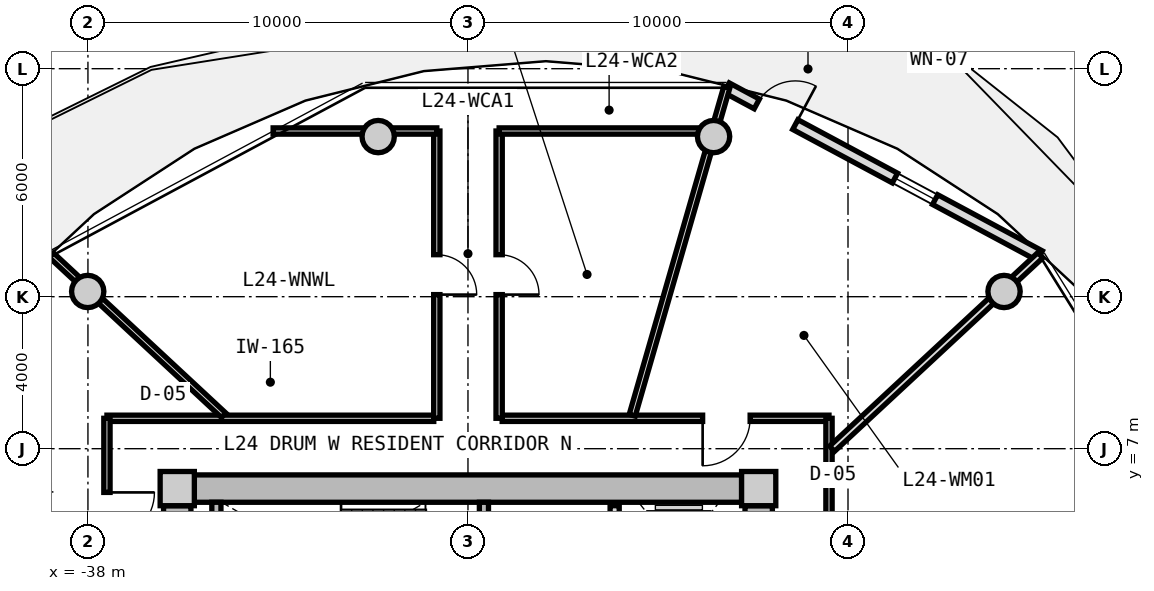
"""IFC4 building model, lengths in metres.
Left out: names, types, materials, properties, quantities, classifications, styles, units other than length and angle.
Written with IfcOpenShell. Run it as: python <this file> out.ifc"""

import sys

from ifc_helpers import new_model, si_unit, direction, frame, frame_2d, origin, origin_2d, place, context, subcontext, project, spatial, rectangle, circle, extrude, source, transform, mapped, element, fill, save


model = new_model("IFC4")
c1 = context("Model", 3, precision=1e-05, world=origin(), true_north=direction((0.0, 1.0)))
c2 = subcontext(c1, "Body", "Model", "MODEL_VIEW")
j1 = project(units=[si_unit("LENGTHUNIT", "METRE"), si_unit("PLANEANGLEUNIT", "RADIAN")], contexts=[c1])
p1 = place(None, origin())
s1 = spatial("IfcSite", under=j1, at=p1, CompositionType="ELEMENT")
p2 = place(p1, origin())
s2 = spatial("IfcBuilding", under=s1, at=p2, CompositionType="ELEMENT")
p3 = place(p2, frame((0.0, 0.0, 81.0)))
s3 = spatial("IfcBuildingStorey", under=s2, at=p3, CompositionType="ELEMENT", Elevation=81.0)
m1 = source(origin(), c2, "Body", "SweptSolid", [
    extrude(rectangle(XDim=0.9, YDim=0.9, at=origin_2d()), origin(), (0.0, 0.0, 1.0), 3.05),
])
for number, where, z_axis, x_axis in (
    (1, (-20.35, 5.95, 0.0), (0.0, 0.0, 1.0), (1.0, 0.0, 0.0)),
    (2, (-35.65, 5.95, 0.0), (0.0, 0.0, 1.0), (1.0, 0.0, 0.0)),
):
    element("IfcColumn", number, at=place(p3, frame(where, z_axis=z_axis, x_axis=x_axis)), inside=s3, PredefinedType="COLUMN", context=c2, shape_type="MappedRepresentation", body=[
        mapped(m1, transform((0.0, 0.0, 0.0), x_axis=(1.0, 0.0, 0.0), y_axis=(0.0, 1.0, 0.0), z_axis=(0.0, 0.0, 1.0), scale=1.0)),
    ])
m2 = source(origin(), c2, "Body", "SweptSolid", [
    extrude(rectangle(XDim=14.4, YDim=0.72, at=frame_2d((7.2, 0.0))), origin(), (0.0, 0.0, 1.0), 2.79),
])
p4 = place(p3, frame((-35.2, 5.95, 0.0), z_axis=(0.0, 0.0, 1.0), x_axis=(1.0, 0.0, 0.0)))
e3 = element("IfcWall", 3, at=p4, inside=s3, PredefinedType="SHEAR", context=c2, shape_type="MappedRepresentation", body=[
    mapped(m2, transform((0.0, 0.0, 0.0), x_axis=(1.0, 0.0, 0.0), y_axis=(0.0, 1.0, 0.0), z_axis=(0.0, 0.0, 1.0), scale=1.0)),
])
m3 = source(origin(), c2, "Body", "SweptSolid", [
    extrude(rectangle(XDim=11.0, YDim=0.72, at=frame_2d((5.5, 0.0))), origin(), (0.0, 0.0, 1.0), 2.79),
])
p5 = place(p3, frame((-35.65, -5.5, 0.0), z_axis=(0.0, 0.0, 1.0), x_axis=(0.0, 1.0, 0.0)))
e4 = element("IfcWall", 4, at=p5, inside=s3, PredefinedType="SHEAR", context=c2, shape_type="MappedRepresentation", body=[
    mapped(m3, transform((0.0, 0.0, 0.0), x_axis=(1.0, 0.0, 0.0), y_axis=(0.0, 1.0, 0.0), z_axis=(0.0, 0.0, 1.0), scale=1.0)),
])
p6 = place(p5, frame((3.8, 0.0, 0.0)))
e5 = element("IfcOpeningElement", 5, at=p6, cuts=e4, PredefinedType="OPENING", context=c2, shape_type="SweptSolid", body=[
    extrude(rectangle(XDim=1.2, YDim=2.15, at=frame_2d((0.6, 1.075))), frame((0.0, 0.37, 0.0), z_axis=(0.0, -1.0, 0.0), x_axis=(1.0, 0.0, 0.0)), (0.0, 0.0, 1.0), 0.74),
])
p7 = place(p3, frame((-20.35, 5.5, 0.0), z_axis=(0.0, 0.0, 1.0), x_axis=(0.0, -1.0, 0.0)))
e6 = element("IfcWall", 6, at=p7, inside=s3, PredefinedType="SHEAR", context=c2, shape_type="MappedRepresentation", body=[
    mapped(m3, transform((0.0, 0.0, 0.0), x_axis=(1.0, 0.0, 0.0), y_axis=(0.0, 1.0, 0.0), z_axis=(0.0, 0.0, 1.0), scale=1.0)),
])
p8 = place(p7, frame((5.65, 0.0, 0.0)))
e7 = element("IfcOpeningElement", 7, at=p8, cuts=e6, PredefinedType="OPENING", context=c2, shape_type="SweptSolid", body=[
    extrude(rectangle(XDim=1.2, YDim=2.15, at=frame_2d((0.6, 1.075))), frame((0.0, 0.37, 0.0), z_axis=(0.0, -1.0, 0.0), x_axis=(1.0, 0.0, 0.0)), (0.0, 0.0, 1.0), 0.74),
])
m4 = source(origin(), c2, "Body", "SweptSolid", [
    extrude(circle(Radius=0.425, at=origin_2d()), origin(), (0.0, 0.0, 1.0), 3.05),
])
for number, where, z_axis, x_axis in (
    (8, (-13.894, 11.137, 0.0), (0.0, 0.0, 1.0), (1.0, 0.0, 0.0)),
    (9, (-21.537, 15.213, 0.0), (0.0, 0.0, 1.0), (1.0, 0.0, 0.0)),
    (10, (-30.363, 15.213, 0.0), (0.0, 0.0, 1.0), (1.0, 0.0, 0.0)),
    (11, (-38.006, 11.137, 0.0), (0.0, 0.0, 1.0), (1.0, 0.0, 0.0)),
):
    element("IfcColumn", number, at=place(p3, frame(where, z_axis=z_axis, x_axis=x_axis)), inside=s3, PredefinedType="COLUMN", context=c2, shape_type="MappedRepresentation", body=[
        mapped(m4, transform((0.0, 0.0, 0.0), x_axis=(1.0, 0.0, 0.0), y_axis=(0.0, 1.0, 0.0), z_axis=(0.0, 0.0, 1.0), scale=1.0)),
    ])
m5 = source(origin(), c2, "Body", "SweptSolid", [
    extrude(rectangle(XDim=9.351, YDim=0.29, at=frame_2d((4.675, 0.0))), origin(), (0.0, 0.0, 1.0), 2.79),
])
p9 = place(p3, frame((-21.193, 16.498, 0.0), z_axis=(0.0, 0.0, 1.0), x_axis=(0.881184411073, -0.472772708267, 0.0)))
e12 = element("IfcWall", 12, at=p9, inside=s3, PredefinedType="SOLIDWALL", context=c2, shape_type="MappedRepresentation", body=[
    mapped(m5, transform((0.0, 0.0, 0.0), x_axis=(1.0, 0.0, 0.0), y_axis=(0.0, 1.0, 0.0), z_axis=(0.0, 0.0, 1.0), scale=1.0)),
])
p10 = place(p9, frame((0.9, 0.0, 0.0)))
e13 = element("IfcOpeningElement", 13, at=p10, cuts=e12, PredefinedType="OPENING", context=c2, shape_type="SweptSolid", body=[
    extrude(rectangle(XDim=1.15, YDim=2.25, at=frame_2d((0.575, 1.125))), frame((0.0, 0.155, 0.0), z_axis=(0.0, -1.0, 0.0), x_axis=(1.0, 0.0, 0.0)), (0.0, 0.0, 1.0), 0.31),
])
p11 = place(p9, frame((5.025, 0.0, 0.85)))
e14 = element("IfcOpeningElement", 14, at=p11, cuts=e12, PredefinedType="OPENING", context=c2, shape_type="SweptSolid", body=[
    extrude(rectangle(XDim=1.2, YDim=1.5, at=frame_2d((0.6, 0.75))), frame((0.0, 0.155, 0.0), z_axis=(0.0, -1.0, 0.0), x_axis=(1.0, 0.0, 0.0)), (0.0, 0.0, 1.0), 0.31),
])
m6 = source(origin(), c2, "Body", "SweptSolid", [
    extrude(rectangle(XDim=3.14, YDim=0.24, at=frame_2d((1.57, 0.0))), origin(), (0.0, 0.0, 1.0), 2.79),
])
p12 = place(p3, frame((-34.62, 2.45, 0.0), z_axis=(0.0, 0.0, 1.0), x_axis=(0.0, 1.0, 0.0)))
e15 = element("IfcWall", 15, at=p12, inside=s3, PredefinedType="PARTITIONING", context=c2, shape_type="MappedRepresentation", body=[
    mapped(m6, transform((0.0, 0.0, 0.0), x_axis=(1.0, 0.0, 0.0), y_axis=(0.0, 1.0, 0.0), z_axis=(0.0, 0.0, 1.0), scale=1.0)),
])
p13 = place(p3, frame((-27.58, 2.45, 0.0), z_axis=(0.0, 0.0, 1.0), x_axis=(0.0, 1.0, 0.0)))
e16 = element("IfcWall", 16, at=p13, inside=s3, PredefinedType="PARTITIONING", context=c2, shape_type="MappedRepresentation", body=[
    mapped(m6, transform((0.0, 0.0, 0.0), x_axis=(1.0, 0.0, 0.0), y_axis=(0.0, 1.0, 0.0), z_axis=(0.0, 0.0, 1.0), scale=1.0)),
])
p14 = place(p13, frame((0.55, 0.0, 0.0)))
e17 = element("IfcOpeningElement", 17, at=p14, cuts=e16, PredefinedType="OPENING", context=c2, shape_type="SweptSolid", body=[
    extrude(rectangle(XDim=1.1, YDim=2.15, at=frame_2d((0.55, 1.075))), frame((0.0, 0.13, 0.0), z_axis=(0.0, -1.0, 0.0), x_axis=(1.0, 0.0, 0.0)), (0.0, 0.0, 1.0), 0.26),
])
m7 = source(origin(), c2, "Body", "SweptSolid", [
    extrude(rectangle(XDim=5.0, YDim=0.24, at=frame_2d((2.5, 0.0))), origin(), (0.0, 0.0, 1.0), 2.775),
])
p15 = place(p3, frame((-24.14, 0.5, 0.0), z_axis=(0.0, 0.0, 1.0), x_axis=(0.0, 1.0, 0.0)))
e18 = element("IfcWall", 18, at=p15, inside=s3, PredefinedType="PARTITIONING", context=c2, shape_type="MappedRepresentation", body=[
    mapped(m7, transform((0.0, 0.0, 0.0), x_axis=(1.0, 0.0, 0.0), y_axis=(0.0, 1.0, 0.0), z_axis=(0.0, 0.0, 1.0), scale=1.0)),
])
p16 = place(p15, frame((3.05, 0.0, 0.0)))
e19 = element("IfcOpeningElement", 19, at=p16, cuts=e18, PredefinedType="OPENING", context=c2, shape_type="SweptSolid", body=[
    extrude(rectangle(XDim=1.3, YDim=2.2, at=frame_2d((0.65, 1.1))), frame((0.0, 0.13, 0.0), z_axis=(0.0, -1.0, 0.0), x_axis=(1.0, 0.0, 0.0)), (0.0, 0.0, 1.0), 0.26),
])
p17 = place(p15, frame((0.55, 0.0, 0.0)))
e20 = element("IfcOpeningElement", 20, at=p17, cuts=e18, PredefinedType="OPENING", context=c2, shape_type="SweptSolid", body=[
    extrude(rectangle(XDim=1.3, YDim=2.2, at=frame_2d((0.65, 1.1))), frame((0.0, 0.13, 0.0), z_axis=(0.0, -1.0, 0.0), x_axis=(1.0, 0.0, 0.0)), (0.0, 0.0, 1.0), 0.26),
])
m8 = source(origin(), c2, "Body", "SweptSolid", [
    extrude(rectangle(XDim=8.6, YDim=0.165, at=frame_2d((4.3, 0.0))), origin(), (0.0, 0.0, 1.0), 2.775),
])
p18 = place(p3, frame((-37.5, 7.8, 0.0), z_axis=(0.0, 0.0, 1.0), x_axis=(1.0, 0.0, 0.0)))
e21 = element("IfcWall", 21, at=p18, inside=s3, PredefinedType="PARTITIONING", context=c2, shape_type="MappedRepresentation", body=[
    mapped(m8, transform((0.0, 0.0, 0.0), x_axis=(1.0, 0.0, 0.0), y_axis=(0.0, 1.0, 0.0), z_axis=(0.0, 0.0, 1.0), scale=1.0)),
])
p19 = place(p3, frame((-27.1, 7.8, 0.0), z_axis=(0.0, 0.0, 1.0), x_axis=(1.0, 0.0, 0.0)))
e22 = element("IfcWall", 22, at=p19, inside=s3, PredefinedType="PARTITIONING", context=c2, shape_type="MappedRepresentation", body=[
    mapped(m8, transform((0.0, 0.0, 0.0), x_axis=(1.0, 0.0, 0.0), y_axis=(0.0, 1.0, 0.0), z_axis=(0.0, 0.0, 1.0), scale=1.0)),
])
p20 = place(p19, frame((5.275, 0.0, 0.0)))
e23 = element("IfcOpeningElement", 23, at=p20, cuts=e22, PredefinedType="OPENING", context=c2, shape_type="SweptSolid", body=[
    extrude(rectangle(XDim=1.25, YDim=2.2, at=frame_2d((0.625, 1.1))), frame((0.0, 0.093, 0.0), z_axis=(0.0, -1.0, 0.0), x_axis=(1.0, 0.0, 0.0)), (0.0, 0.0, 1.0), 0.185),
])
m9 = source(origin(), c2, "Body", "SweptSolid", [
    extrude(rectangle(XDim=15.6, YDim=0.165, at=frame_2d((7.8, 0.0))), origin(), (0.0, 0.0, 1.0), 2.775),
])
p21 = place(p3, frame((-37.5, -7.8, 0.0), z_axis=(0.0, 0.0, 1.0), x_axis=(0.0, 1.0, 0.0)))
e24 = element("IfcWall", 24, at=p21, inside=s3, PredefinedType="PARTITIONING", context=c2, shape_type="MappedRepresentation", body=[
    mapped(m9, transform((0.0, 0.0, 0.0), x_axis=(1.0, 0.0, 0.0), y_axis=(0.0, 1.0, 0.0), z_axis=(0.0, 0.0, 1.0), scale=1.0)),
])
p22 = place(p21, frame((12.399, 0.0, 0.0)))
e25 = element("IfcOpeningElement", 25, at=p22, cuts=e24, PredefinedType="OPENING", context=c2, shape_type="SweptSolid", body=[
    extrude(rectangle(XDim=1.25, YDim=2.2, at=frame_2d((0.625, 1.1))), frame((0.0, 0.093, 0.0), z_axis=(0.0, -1.0, 0.0), x_axis=(1.0, 0.0, 0.0)), (0.0, 0.0, 1.0), 0.185),
])
p23 = place(p21, frame((7.175, 0.0, 0.0)))
e26 = element("IfcOpeningElement", 26, at=p23, cuts=e24, PredefinedType="OPENING", context=c2, shape_type="SweptSolid", body=[
    extrude(rectangle(XDim=1.25, YDim=2.2, at=frame_2d((0.625, 1.1))), frame((0.0, 0.093, 0.0), z_axis=(0.0, -1.0, 0.0), x_axis=(1.0, 0.0, 0.0)), (0.0, 0.0, 1.0), 0.185),
])
p24 = place(p3, frame((-18.5, 7.8, 0.0), z_axis=(0.0, 0.0, 1.0), x_axis=(0.0, -1.0, 0.0)))
e27 = element("IfcWall", 27, at=p24, inside=s3, PredefinedType="PARTITIONING", context=c2, shape_type="MappedRepresentation", body=[
    mapped(m9, transform((0.0, 0.0, 0.0), x_axis=(1.0, 0.0, 0.0), y_axis=(0.0, 1.0, 0.0), z_axis=(0.0, 0.0, 1.0), scale=1.0)),
])
p25 = place(p24, frame((12.81, 0.0, 0.0)))
e28 = element("IfcOpeningElement", 28, at=p25, cuts=e27, PredefinedType="OPENING", context=c2, shape_type="SweptSolid", body=[
    extrude(rectangle(XDim=1.05, YDim=2.15, at=frame_2d((0.525, 1.075))), frame((0.0, 0.093, 0.0), z_axis=(0.0, -1.0, 0.0), x_axis=(1.0, 0.0, 0.0)), (0.0, 0.0, 1.0), 0.185),
])
p26 = place(p24, frame((10.21, 0.0, 0.0)))
e29 = element("IfcOpeningElement", 29, at=p26, cuts=e27, PredefinedType="OPENING", context=c2, shape_type="SweptSolid", body=[
    extrude(rectangle(XDim=1.05, YDim=2.15, at=frame_2d((0.525, 1.075))), frame((0.0, 0.093, 0.0), z_axis=(0.0, -1.0, 0.0), x_axis=(1.0, 0.0, 0.0)), (0.0, 0.0, 1.0), 0.185),
])
p27 = place(p24, frame((4.575, 0.0, 0.0)))
e30 = element("IfcOpeningElement", 30, at=p27, cuts=e27, PredefinedType="OPENING", context=c2, shape_type="SweptSolid", body=[
    extrude(rectangle(XDim=1.25, YDim=2.2, at=frame_2d((0.625, 1.1))), frame((0.0, 0.093, 0.0), z_axis=(0.0, -1.0, 0.0), x_axis=(1.0, 0.0, 0.0)), (0.0, 0.0, 1.0), 0.185),
])
m10 = source(origin(), c2, "Body", "SweptSolid", [
    extrude(rectangle(XDim=8.989, YDim=0.165, at=frame_2d((4.495, 0.0))), origin(), (0.0, 0.0, 1.0), 2.415),
])
p28 = place(p3, frame((-23.678, 7.88, 0.0), z_axis=(0.0, 0.0, 1.0), x_axis=(0.27702323008, 0.960863221274, 0.0)))
e31 = element("IfcWall", 31, at=p28, inside=s3, PredefinedType="PARTITIONING", context=c2, shape_type="MappedRepresentation", body=[
    mapped(m10, transform((0.0, 0.0, 0.0), x_axis=(1.0, 0.0, 0.0), y_axis=(0.0, 1.0, 0.0), z_axis=(0.0, 0.0, 1.0), scale=1.0)),
])
m11 = source(origin(), c2, "Body", "SweptSolid", [
    extrude(rectangle(XDim=6.187, YDim=0.165, at=frame_2d((3.093, 0.0))), origin(), (0.0, 0.0, 1.0), 2.275),
])
p29 = place(p3, frame((-34.429, 7.88, 0.0), z_axis=(0.0, 0.0, 1.0), x_axis=(-0.732501077882, 0.680765870841, 0.0)))
e32 = element("IfcWall", 32, at=p29, inside=s3, PredefinedType="PARTITIONING", context=c2, shape_type="MappedRepresentation", body=[
    mapped(m11, transform((0.0, 0.0, 0.0), x_axis=(1.0, 0.0, 0.0), y_axis=(0.0, 1.0, 0.0), z_axis=(0.0, 0.0, 1.0), scale=1.0)),
])
m12 = source(origin(), c2, "Body", "SweptSolid", [
    extrude(rectangle(XDim=7.56, YDim=0.165, at=frame_2d((3.78, 0.0))), origin(), (0.0, 0.0, 1.0), 2.775),
])
p30 = place(p3, frame((-28.82, 7.8, 0.0), z_axis=(0.0, 0.0, 1.0), x_axis=(0.0, 1.0, 0.0)))
e33 = element("IfcWall", 33, at=p30, inside=s3, PredefinedType="PARTITIONING", context=c2, shape_type="MappedRepresentation", body=[
    mapped(m12, transform((0.0, 0.0, 0.0), x_axis=(1.0, 0.0, 0.0), y_axis=(0.0, 1.0, 0.0), z_axis=(0.0, 0.0, 1.0), scale=1.0)),
])
p31 = place(p30, frame((3.255, 0.0, 0.0)))
e34 = element("IfcOpeningElement", 34, at=p31, cuts=e33, PredefinedType="OPENING", context=c2, shape_type="SweptSolid", body=[
    extrude(rectangle(XDim=1.05, YDim=2.15, at=frame_2d((0.525, 1.075))), frame((0.0, 0.093, 0.0), z_axis=(0.0, -1.0, 0.0), x_axis=(1.0, 0.0, 0.0)), (0.0, 0.0, 1.0), 0.185),
])
m13 = source(origin(), c2, "Body", "SweptSolid", [
    extrude(rectangle(XDim=4.307, YDim=0.165, at=frame_2d((2.153, 0.0))), origin(), (0.0, 0.0, 1.0), 2.275),
])
p32 = place(p3, frame((-33.127, 15.36, 0.0), z_axis=(0.0, 0.0, 1.0), x_axis=(1.0, 0.0, 0.0)))
e35 = element("IfcWall", 35, at=p32, inside=s3, PredefinedType="PARTITIONING", context=c2, shape_type="MappedRepresentation", body=[
    mapped(m13, transform((0.0, 0.0, 0.0), x_axis=(1.0, 0.0, 0.0), y_axis=(0.0, 1.0, 0.0), z_axis=(0.0, 0.0, 1.0), scale=1.0)),
])
p33 = place(p3, frame((-27.18, 7.8, 0.0), z_axis=(0.0, 0.0, 1.0), x_axis=(0.0, 1.0, 0.0)))
e36 = element("IfcWall", 36, at=p33, inside=s3, PredefinedType="PARTITIONING", context=c2, shape_type="MappedRepresentation", body=[
    mapped(m12, transform((0.0, 0.0, 0.0), x_axis=(1.0, 0.0, 0.0), y_axis=(0.0, 1.0, 0.0), z_axis=(0.0, 0.0, 1.0), scale=1.0)),
])
p34 = place(p33, frame((3.255, 0.0, 0.0)))
e37 = element("IfcOpeningElement", 37, at=p34, cuts=e36, PredefinedType="OPENING", context=c2, shape_type="SweptSolid", body=[
    extrude(rectangle(XDim=1.05, YDim=2.15, at=frame_2d((0.525, 1.075))), frame((0.0, 0.093, 0.0), z_axis=(0.0, -1.0, 0.0), x_axis=(1.0, 0.0, 0.0)), (0.0, 0.0, 1.0), 0.185),
])
m14 = source(origin(), c2, "Body", "SweptSolid", [
    extrude(rectangle(XDim=5.814, YDim=0.165, at=frame_2d((2.907, 0.0))), origin(), (0.0, 0.0, 1.0), 2.275),
])
p35 = place(p3, frame((-27.18, 15.36, 0.0), z_axis=(0.0, 0.0, 1.0), x_axis=(1.0, 0.0, 0.0)))
e38 = element("IfcWall", 38, at=p35, inside=s3, PredefinedType="PARTITIONING", context=c2, shape_type="MappedRepresentation", body=[
    mapped(m14, transform((0.0, 0.0, 0.0), x_axis=(1.0, 0.0, 0.0), y_axis=(0.0, 1.0, 0.0), z_axis=(0.0, 0.0, 1.0), scale=1.0)),
])
m15 = source(origin(), c2, "Body", "SweptSolid", [
    extrude(rectangle(XDim=7.482, YDim=0.19, at=frame_2d((3.741, 0.0))), origin(), (0.0, 0.0, 1.0), 2.275),
])
p36 = place(p3, frame((-18.42, 6.998, 0.0), z_axis=(0.0, 0.0, 1.0), x_axis=(0.732508698043, 0.680757671489, 0.0)))
e39 = element("IfcWall", 39, at=p36, inside=s3, PredefinedType="PARTITIONING", context=c2, shape_type="MappedRepresentation", body=[
    mapped(m15, transform((0.0, 0.0, 0.0), x_axis=(1.0, 0.0, 0.0), y_axis=(0.0, 1.0, 0.0), z_axis=(0.0, 0.0, 1.0), scale=1.0)),
])
m16 = source(origin(), c2, "Body", "SweptSolid", [
    extrude(rectangle(XDim=1.15, YDim=2.25, at=frame_2d((0.575, 1.125))), frame((0.0, 0.025, 0.0), z_axis=(0.0, -1.0, 0.0), x_axis=(1.0, 0.0, 0.0)), (0.0, 0.0, 1.0), 0.05),
])
p37 = place(p10, origin())
e40 = element("IfcDoor", 40, at=p37, inside=s3, OperationType="SINGLE_SWING_RIGHT", PredefinedType="DOOR", context=c2, shape_type="MappedRepresentation", body=[
    mapped(m16, transform((0.0, 0.0, 0.0), x_axis=(1.0, 0.0, 0.0), y_axis=(0.0, 1.0, 0.0), z_axis=(0.0, 0.0, 1.0), scale=1.0)),
])
fill(e13, e40)
m17 = source(origin(), c2, "Body", "SweptSolid", [
    extrude(rectangle(XDim=1.2, YDim=1.5, at=frame_2d((0.6, 0.75))), frame((0.0, 0.03, 0.0), z_axis=(0.0, -1.0, 0.0), x_axis=(1.0, 0.0, 0.0)), (0.0, 0.0, 1.0), 0.06),
])
p38 = place(p11, origin())
e41 = element("IfcWindow", 41, at=p38, inside=s3, PartitioningType="SINGLE_PANEL", PredefinedType="WINDOW", context=c2, shape_type="MappedRepresentation", body=[
    mapped(m17, transform((0.0, 0.0, 0.0), x_axis=(1.0, 0.0, 0.0), y_axis=(0.0, 1.0, 0.0), z_axis=(0.0, 0.0, 1.0), scale=1.0)),
])
fill(e14, e41)
m18 = source(origin(), c2, "Body", "SweptSolid", [
    extrude(rectangle(XDim=1.05, YDim=2.15, at=frame_2d((0.525, 1.075))), frame((0.0, 0.025, 0.0), z_axis=(0.0, -1.0, 0.0), x_axis=(1.0, 0.0, 0.0)), (0.0, 0.0, 1.0), 0.05),
])
p39 = place(p31, frame((1.05, 0.0, 0.0), z_axis=(0.0, 0.0, 1.0), x_axis=(-1.0, 0.0, 0.0)))
e42 = element("IfcDoor", 42, at=p39, inside=s3, OperationType="SINGLE_SWING_RIGHT", PredefinedType="DOOR", context=c2, shape_type="MappedRepresentation", body=[
    mapped(m18, transform((0.0, 0.0, 0.0), x_axis=(1.0, 0.0, 0.0), y_axis=(0.0, 1.0, 0.0), z_axis=(0.0, 0.0, 1.0), scale=1.0)),
])
fill(e34, e42)
p40 = place(p34, frame((1.05, 0.0, 0.0), z_axis=(0.0, 0.0, 1.0), x_axis=(-1.0, 0.0, 0.0)))
e43 = element("IfcDoor", 43, at=p40, inside=s3, OperationType="SINGLE_SWING_RIGHT", PredefinedType="DOOR", context=c2, shape_type="MappedRepresentation", body=[
    mapped(m18, transform((0.0, 0.0, 0.0), x_axis=(1.0, 0.0, 0.0), y_axis=(0.0, 1.0, 0.0), z_axis=(0.0, 0.0, 1.0), scale=1.0)),
])
fill(e37, e43)
m19 = source(origin(), c2, "Body", "SweptSolid", [
    extrude(rectangle(XDim=1.25, YDim=2.2, at=frame_2d((0.625, 1.1))), frame((0.0, 0.025, 0.0), z_axis=(0.0, -1.0, 0.0), x_axis=(1.0, 0.0, 0.0)), (0.0, 0.0, 1.0), 0.05),
])
p41 = place(p22, frame((1.25, 0.0, 0.0), z_axis=(0.0, 0.0, 1.0), x_axis=(-1.0, 0.0, 0.0)))
e44 = element("IfcDoor", 44, at=p41, inside=s3, OperationType="SINGLE_SWING_LEFT", PredefinedType="DOOR", context=c2, shape_type="MappedRepresentation", body=[
    mapped(m19, transform((0.0, 0.0, 0.0), x_axis=(1.0, 0.0, 0.0), y_axis=(0.0, 1.0, 0.0), z_axis=(0.0, 0.0, 1.0), scale=1.0)),
])
fill(e25, e44)
p42 = place(p20, frame((1.25, 0.0, 0.0), z_axis=(0.0, 0.0, 1.0), x_axis=(-1.0, 0.0, 0.0)))
e45 = element("IfcDoor", 45, at=p42, inside=s3, OperationType="SINGLE_SWING_RIGHT", PredefinedType="DOOR", context=c2, shape_type="MappedRepresentation", body=[
    mapped(m19, transform((0.0, 0.0, 0.0), x_axis=(1.0, 0.0, 0.0), y_axis=(0.0, 1.0, 0.0), z_axis=(0.0, 0.0, 1.0), scale=1.0)),
])
fill(e23, e45)
save(model, sys.argv[1])
